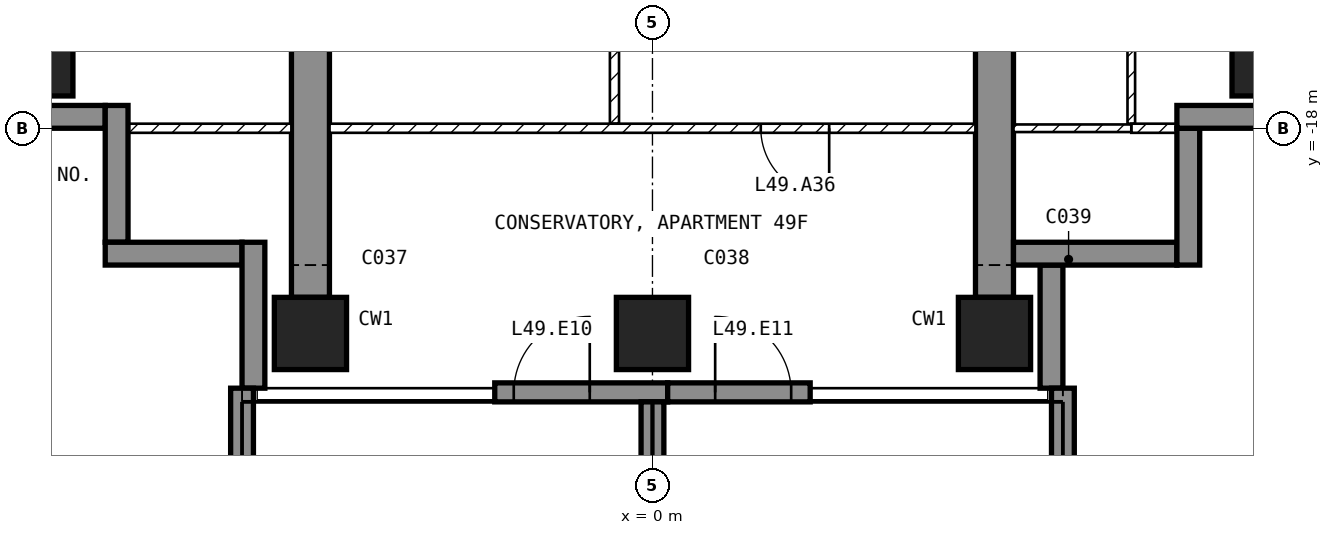
"""IFC4 building model, lengths in metres.
Left out: names, types, materials, properties, quantities, classifications, styles, units other than length and angle.
Written with IfcOpenShell. Run it as: python <this file> out.ifc"""

import sys

from ifc_helpers import new_model, si_unit, direction, frame, frame_2d, origin, origin_2d, place, context, subcontext, project, spatial, polyline, rectangle, outline, extrude, element, fill, save


model = new_model("IFC4")
c1 = context("Model", 3, precision=1e-05, world=origin(), true_north=direction((0.0, 1.0)))
c2 = subcontext(c1, "Body", "Model", "MODEL_VIEW")
j1 = project(units=[si_unit("LENGTHUNIT", "METRE"), si_unit("PLANEANGLEUNIT", "RADIAN")], contexts=[c1])
p1 = place(None, origin())
s1 = spatial("IfcSite", under=j1, at=p1, CompositionType="ELEMENT")
p2 = place(p1, origin())
s2 = spatial("IfcBuilding", under=s1, at=p2, CompositionType="ELEMENT")
p3 = place(p2, frame((0.0, 0.0, 198.1)))
s3 = spatial("IfcBuildingStorey", under=s2, at=p3, CompositionType="ELEMENT", Elevation=198.1)
for number, where, z_axis, x_axis in (
    (1, (-8.1, -17.1, -0.25), (0.0, 0.0, 1.0), (1.0, 0.0, 0.0)),
    (2, (-4.5, -20.7, -0.25), (0.0, 0.0, 1.0), (1.0, 0.0, 0.0)),
    (3, (0.0, -20.7, -0.25), (0.0, 0.0, 1.0), (1.0, 0.0, 0.0)),
    (4, (4.5, -20.7, -0.25), (0.0, 0.0, 1.0), (1.0, 0.0, 0.0)),
    (5, (8.1, -17.1, -0.25), (0.0, 0.0, 1.0), (1.0, 0.0, 0.0)),
):
    element("IfcColumn", number, at=place(p3, frame(where, z_axis=z_axis, x_axis=x_axis)), inside=s3, PredefinedType="COLUMN", context=c2, shape_type="SweptSolid", body=[
        extrude(rectangle(XDim=0.95, YDim=0.95, at=origin_2d()), origin(), (0.0, 0.0, 1.0), 3.5),
    ])
for number, where, z_axis, x_axis in (
    (6, (-4.75, -20.225, -0.25), (1.0, 0.0, 0.0), (0.0, 1.0, 0.0)),
    (7, (4.25, -20.225, -0.25), (1.0, 0.0, 0.0), (0.0, 1.0, 0.0)),
):
    element("IfcWall", number, at=place(p3, frame(where, z_axis=z_axis, x_axis=x_axis)), inside=s3, PredefinedType="SHEAR", context=c2, shape_type="SweptSolid", body=[
        extrude(outline(polyline([(0.0, 0.0), (6.725, 0.0), (6.725, 2.65), (9.125, 2.65), (9.125, 0.0), (11.225, 0.0), (11.225, 3.5), (0.0, 3.5), (0.0, 0.0)])), origin(), (0.0, 0.0, 1.0), 0.5),
    ])
p4 = place(p3, frame((-2.075, -21.475, 0.0), z_axis=(0.0, 0.0, 1.0), x_axis=(1.0, 0.0, 0.0)))
e8 = element("IfcWall", 8, at=p4, inside=s3, PredefinedType="SOLIDWALL", context=c2, shape_type="SweptSolid", body=[
    extrude(rectangle(XDim=2.275, YDim=0.25, at=frame_2d((1.137, 0.0))), origin(), (0.0, 0.0, 1.0), 3.25),
])
p5 = place(p4, frame((0.25, 0.0, 0.0)))
e9 = element("IfcOpeningElement", 9, at=p5, cuts=e8, PredefinedType="OPENING", context=c2, shape_type="SweptSolid", body=[
    extrude(rectangle(XDim=1.0, YDim=2.4, at=frame_2d((0.5, 1.2))), frame((0.0, 0.135, 0.0), z_axis=(0.0, -1.0, 0.0), x_axis=(1.0, 0.0, 0.0)), (0.0, 0.0, 1.0), 0.27),
])
p6 = place(p3, frame((0.2, -21.475, 0.0), z_axis=(0.0, 0.0, 1.0), x_axis=(1.0, 0.0, 0.0)))
e10 = element("IfcWall", 10, at=p6, inside=s3, PredefinedType="SOLIDWALL", context=c2, shape_type="SweptSolid", body=[
    extrude(rectangle(XDim=1.875, YDim=0.25, at=frame_2d((0.938, 0.0))), origin(), (0.0, 0.0, 1.0), 3.25),
])
p7 = place(p6, frame((0.625, 0.0, 0.0)))
e11 = element("IfcOpeningElement", 11, at=p7, cuts=e10, PredefinedType="OPENING", context=c2, shape_type="SweptSolid", body=[
    extrude(rectangle(XDim=1.0, YDim=2.4, at=frame_2d((0.5, 1.2))), frame((0.0, 0.135, 0.0), z_axis=(0.0, -1.0, 0.0), x_axis=(1.0, 0.0, 0.0)), (0.0, 0.0, 1.0), 0.27),
])
p8 = place(p3, frame((5.25, -21.42, 0.0), z_axis=(0.0, 0.0, 1.0), x_axis=(0.0, 1.0, 0.0)))
e12 = element("IfcWall", 12, at=p8, inside=s3, PredefinedType="SOLIDWALL", context=c2, shape_type="SweptSolid", body=[
    extrude(rectangle(XDim=1.62, YDim=0.3, at=frame_2d((0.81, 0.0))), origin(), (0.0, 0.0, 1.0), 3.25),
])
p9 = place(p3, frame((4.75, -19.65, 0.0), z_axis=(0.0, 0.0, 1.0), x_axis=(1.0, 0.0, 0.0)))
e13 = element("IfcWall", 13, at=p9, inside=s3, PredefinedType="SOLIDWALL", context=c2, shape_type="SweptSolid", body=[
    extrude(rectangle(XDim=2.15, YDim=0.3, at=frame_2d((1.075, 0.0))), origin(), (0.0, 0.0, 1.0), 3.25),
])
p10 = place(p3, frame((7.05, -19.8, 0.0), z_axis=(0.0, 0.0, 1.0), x_axis=(0.0, 1.0, 0.0)))
e14 = element("IfcWall", 14, at=p10, inside=s3, PredefinedType="SOLIDWALL", context=c2, shape_type="SweptSolid", body=[
    extrude(rectangle(XDim=1.8, YDim=0.3, at=frame_2d((0.9, 0.0))), origin(), (0.0, 0.0, 1.0), 3.25),
])
p11 = place(p3, frame((6.9, -17.85, 0.0), z_axis=(0.0, 0.0, 1.0), x_axis=(1.0, 0.0, 0.0)))
e15 = element("IfcWall", 15, at=p11, inside=s3, PredefinedType="SOLIDWALL", context=c2, shape_type="SweptSolid", body=[
    extrude(rectangle(XDim=1.85, YDim=0.3, at=frame_2d((0.925, 0.0))), origin(), (0.0, 0.0, 1.0), 3.25),
])
p12 = place(p3, frame((-8.75, -17.85, 0.0), z_axis=(0.0, 0.0, 1.0), x_axis=(1.0, 0.0, 0.0)))
e16 = element("IfcWall", 16, at=p12, inside=s3, PredefinedType="SOLIDWALL", context=c2, shape_type="SweptSolid", body=[
    extrude(rectangle(XDim=1.55, YDim=0.3, at=frame_2d((0.775, 0.0))), origin(), (0.0, 0.0, 1.0), 3.25),
])
for number, where, z_axis, x_axis in (
    (17, (-7.05, -17.7, 0.0), (0.0, 0.0, 1.0), (0.0, -1.0, 0.0)),
    (18, (-7.2, -19.65, 0.0), (0.0, 0.0, 1.0), (1.0, 0.0, 0.0)),
):
    element("IfcWall", number, at=place(p3, frame(where, z_axis=z_axis, x_axis=x_axis)), inside=s3, PredefinedType="SOLIDWALL", context=c2, shape_type="SweptSolid", body=[
        extrude(rectangle(XDim=1.8, YDim=0.3, at=frame_2d((0.9, 0.0))), origin(), (0.0, 0.0, 1.0), 3.25),
    ])
p13 = place(p3, frame((-5.25, -19.5, 0.0), z_axis=(0.0, 0.0, 1.0), x_axis=(0.0, -1.0, 0.0)))
e19 = element("IfcWall", 19, at=p13, inside=s3, PredefinedType="SOLIDWALL", context=c2, shape_type="SweptSolid", body=[
    extrude(rectangle(XDim=1.92, YDim=0.3, at=frame_2d((0.96, 0.0))), origin(), (0.0, 0.0, 1.0), 3.25),
])
p14 = place(p3, frame((-5.4, -21.42, 0.0), z_axis=(0.0, 0.0, 1.0), x_axis=(0.0, -1.0, 0.0)))
e20 = element("IfcWall", 20, at=p14, inside=s3, PredefinedType="SOLIDWALL", context=c2, shape_type="SweptSolid", body=[
    extrude(rectangle(XDim=2.88, YDim=0.3, at=frame_2d((1.44, 0.0))), origin(), (0.0, 0.0, 1.0), 3.25),
])
p15 = place(p3, frame((0.0, -21.6, 0.0), z_axis=(0.0, 0.0, 1.0), x_axis=(0.0, -1.0, 0.0)))
e21 = element("IfcWall", 21, at=p15, inside=s3, PredefinedType="SOLIDWALL", context=c2, shape_type="SweptSolid", body=[
    extrude(rectangle(XDim=2.7, YDim=0.3, at=frame_2d((1.35, 0.0))), origin(), (0.0, 0.0, 1.0), 3.25),
])
p16 = place(p3, frame((5.4, -21.42, 0.0), z_axis=(0.0, 0.0, 1.0), x_axis=(0.0, -1.0, 0.0)))
e22 = element("IfcWall", 22, at=p16, inside=s3, PredefinedType="SOLIDWALL", context=c2, shape_type="SweptSolid", body=[
    extrude(rectangle(XDim=2.88, YDim=0.3, at=frame_2d((1.44, 0.0))), origin(), (0.0, 0.0, 1.0), 3.25),
])
p17 = place(p3, frame((-0.5, -17.94, 0.0), z_axis=(0.0, 0.0, 1.0), x_axis=(0.0, 1.0, 0.0)))
e23 = element("IfcWall", 23, at=p17, inside=s3, PredefinedType="PARTITIONING", context=c2, shape_type="SweptSolid", body=[
    extrude(rectangle(XDim=2.88, YDim=0.12, at=frame_2d((1.44, 0.0))), origin(), (0.0, 0.0, 1.0), 3.25),
])
p18 = place(p17, frame((0.99, 0.0, 0.0)))
e24 = element("IfcOpeningElement", 24, at=p18, cuts=e23, PredefinedType="OPENING", context=c2, shape_type="SweptSolid", body=[
    extrude(rectangle(XDim=0.9, YDim=2.1, at=frame_2d((0.45, 1.05))), frame((0.0, 0.07, 0.0), z_axis=(0.0, -1.0, 0.0), x_axis=(1.0, 0.0, 0.0)), (0.0, 0.0, 1.0), 0.14),
])
p19 = place(p3, frame((4.25, -18.0, 0.0), z_axis=(0.0, 0.0, 1.0), x_axis=(-1.0, 0.0, 0.0)))
e25 = element("IfcWall", 25, at=p19, inside=s3, PredefinedType="PARTITIONING", context=c2, shape_type="SweptSolid", body=[
    extrude(rectangle(XDim=8.5, YDim=0.12, at=frame_2d((4.25, 0.0))), origin(), (0.0, 0.0, 1.0), 3.25),
])
p20 = place(p19, frame((1.925, 0.0, 0.0)))
e26 = element("IfcOpeningElement", 26, at=p20, cuts=e25, PredefinedType="OPENING", context=c2, shape_type="SweptSolid", body=[
    extrude(rectangle(XDim=0.9, YDim=2.1, at=frame_2d((0.45, 1.05))), frame((0.0, 0.07, 0.0), z_axis=(0.0, -1.0, 0.0), x_axis=(1.0, 0.0, 0.0)), (0.0, 0.0, 1.0), 0.14),
])
p21 = place(p3, frame((6.3, -17.94, 0.0), z_axis=(0.0, 0.0, 1.0), x_axis=(0.0, 1.0, 0.0)))
e27 = element("IfcWall", 27, at=p21, inside=s3, PredefinedType="PARTITIONING", context=c2, shape_type="SweptSolid", body=[
    extrude(rectangle(XDim=3.49, YDim=0.1, at=frame_2d((1.745, 0.0))), origin(), (0.0, 0.0, 1.0), 3.25),
])
p22 = place(p21, frame((1.32, 0.0, 0.0)))
e28 = element("IfcOpeningElement", 28, at=p22, cuts=e27, PredefinedType="OPENING", context=c2, shape_type="SweptSolid", body=[
    extrude(rectangle(XDim=0.85, YDim=2.1, at=frame_2d((0.425, 1.05))), frame((0.0, 0.06, 0.0), z_axis=(0.0, -1.0, 0.0), x_axis=(1.0, 0.0, 0.0)), (0.0, 0.0, 1.0), 0.12),
])
p23 = place(p3, frame((7.12, -18.0, 0.0), z_axis=(0.0, 0.0, 1.0), x_axis=(-1.0, 0.0, 0.0)))
e29 = element("IfcWall", 29, at=p23, inside=s3, PredefinedType="PARTITIONING", context=c2, shape_type="SweptSolid", body=[
    extrude(rectangle(XDim=0.82, YDim=0.12, at=frame_2d((0.41, 0.0))), origin(), (0.0, 0.0, 1.0), 3.25),
])
p24 = place(p3, frame((6.3, -18.0, 0.0), z_axis=(0.0, 0.0, 1.0), x_axis=(-1.0, 0.0, 0.0)))
e30 = element("IfcWall", 30, at=p24, inside=s3, PredefinedType="PARTITIONING", context=c2, shape_type="SweptSolid", body=[
    extrude(rectangle(XDim=1.55, YDim=0.1, at=frame_2d((0.775, 0.0))), origin(), (0.0, 0.0, 1.0), 3.25),
])
p25 = place(p3, frame((-4.75, -18.0, 0.0), z_axis=(0.0, 0.0, 1.0), x_axis=(-1.0, 0.0, 0.0)))
e31 = element("IfcWall", 31, at=p25, inside=s3, PredefinedType="PARTITIONING", context=c2, shape_type="SweptSolid", body=[
    extrude(rectangle(XDim=2.37, YDim=0.12, at=frame_2d((1.185, 0.0))), origin(), (0.0, 0.0, 1.0), 3.25),
])
p26 = place(p5, origin())
e32 = element("IfcDoor", 32, at=p26, inside=s3, OperationType="SINGLE_SWING_RIGHT", PredefinedType="DOOR", context=c2, shape_type="SweptSolid", body=[
    extrude(rectangle(XDim=1.0, YDim=2.4, at=frame_2d((0.5, 1.2))), frame((0.0, 0.025, 0.0), z_axis=(0.0, -1.0, 0.0), x_axis=(1.0, 0.0, 0.0)), (0.0, 0.0, 1.0), 0.05),
])
fill(e9, e32)
p27 = place(p7, origin())
e33 = element("IfcDoor", 33, at=p27, inside=s3, OperationType="SINGLE_SWING_LEFT", PredefinedType="DOOR", context=c2, shape_type="SweptSolid", body=[
    extrude(rectangle(XDim=1.0, YDim=2.4, at=frame_2d((0.5, 1.2))), frame((0.0, 0.025, 0.0), z_axis=(0.0, -1.0, 0.0), x_axis=(1.0, 0.0, 0.0)), (0.0, 0.0, 1.0), 0.05),
])
fill(e11, e33)
p28 = place(p20, origin())
e34 = element("IfcDoor", 34, at=p28, inside=s3, OperationType="SINGLE_SWING_LEFT", PredefinedType="DOOR", context=c2, shape_type="SweptSolid", body=[
    extrude(rectangle(XDim=0.9, YDim=2.1, at=frame_2d((0.45, 1.05))), frame((0.0, 0.025, 0.0), z_axis=(0.0, -1.0, 0.0), x_axis=(1.0, 0.0, 0.0)), (0.0, 0.0, 1.0), 0.05),
])
fill(e26, e34)
save(model, sys.argv[1])
